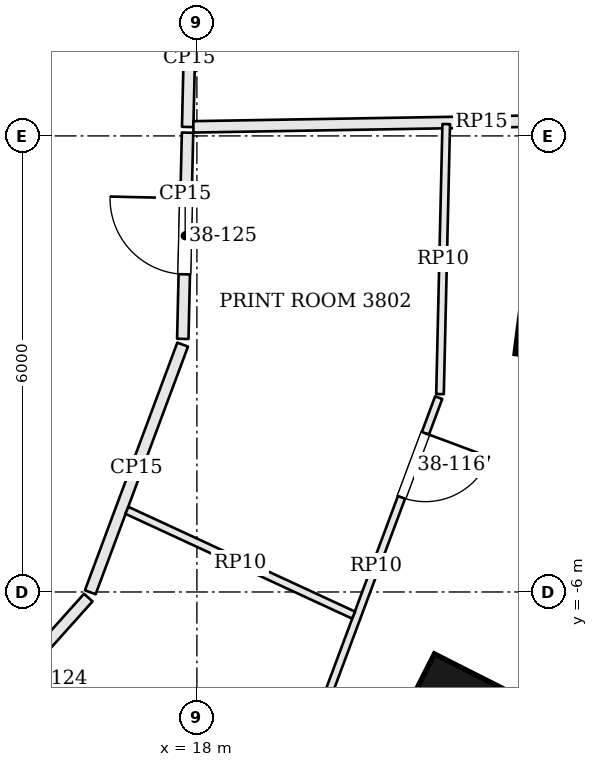
"""IFC4 building model, lengths in metres.
Left out: names, types, materials, properties, quantities, classifications, styles, units other than length and angle.
Written with IfcOpenShell. Run it as: python <this file> out.ifc"""

import sys

from ifc_helpers import new_model, si_unit, direction, frame, frame_2d, origin, origin_2d, place, context, subcontext, project, spatial, rectangle, extrude, element, fill, save


model = new_model("IFC4")
c1 = context("Model", 3, precision=1e-05, world=origin(), true_north=direction((0.0, 1.0)))
c2 = subcontext(c1, "Body", "Model", "MODEL_VIEW")
j1 = project(units=[si_unit("LENGTHUNIT", "METRE"), si_unit("PLANEANGLEUNIT", "RADIAN")], contexts=[c1])
p1 = place(None, origin())
s1 = spatial("IfcSite", under=j1, at=p1, CompositionType="ELEMENT")
p2 = place(p1, origin())
s2 = spatial("IfcBuilding", under=s1, at=p2, CompositionType="ELEMENT")
p3 = place(p2, frame((0.0, 0.0, 157.8)))
s3 = spatial("IfcBuildingStorey", under=s2, at=p3, CompositionType="ELEMENT", Elevation=157.8)
for number, where, z_axis, x_axis in (
    (1, (21.367, -7.554, 0.0), (0.0, 0.0, 1.0), (0.452, 0.892, 0.0)),
    (2, (22.802, -2.389, 0.0), (0.0, 0.0, 1.0), (0.129, 0.992, 0.0)),
):
    element("IfcColumn", number, at=place(p3, frame(where, z_axis=z_axis, x_axis=x_axis)), inside=s3, PredefinedType="COLUMN", context=c2, shape_type="SweptSolid", body=[
        extrude(rectangle(XDim=1.1, YDim=1.1, at=origin_2d()), origin(), (0.0, 0.0, 1.0), 3.9),
    ])
p4 = place(p3, frame((17.879, 0.118, 0.0), z_axis=(0.0, 0.0, 1.0), x_axis=(0.023064558848, 0.999733977679, 0.0)))
e3 = element("IfcWall", 3, at=p4, inside=s3, PredefinedType="PARTITIONING", context=c2, shape_type="SweptSolid", body=[
    extrude(rectangle(XDim=1.81, YDim=0.15, at=frame_2d((0.905, 0.0))), origin(), (0.0, 0.0, 1.0), 3.198),
])
p5 = place(p3, frame((25.538, 0.247, 0.0), z_axis=(0.0, 0.0, 1.0), x_axis=(-0.999857777193, -0.016864915832, 0.0)))
e4 = element("IfcWall", 4, at=p5, inside=s3, PredefinedType="PARTITIONING", context=c2, shape_type="SweptSolid", body=[
    extrude(rectangle(XDim=7.585, YDim=0.15, at=frame_2d((3.793, 0.0))), origin(), (0.0, 0.0, 1.0), 3.234),
])
p6 = place(p3, frame((14.709, -8.152, 0.0), z_axis=(0.0, 0.0, 1.0), x_axis=(0.667275630306, 0.744810870758, 0.0)))
e5 = element("IfcWall", 5, at=p6, inside=s3, PredefinedType="PARTITIONING", context=c2, shape_type="SweptSolid", body=[
    extrude(rectangle(XDim=2.79, YDim=0.15, at=frame_2d((1.395, 0.0))), origin(), (0.0, 0.0, 1.0), 3.198),
])
p7 = place(p6, frame((0.85, 0.0, 0.0)))
e6 = element("IfcOpeningElement", 6, at=p7, cuts=e5, PredefinedType="OPENING", context=c2, shape_type="SweptSolid", body=[
    extrude(rectangle(XDim=1.0, YDim=2.1, at=frame_2d((0.5, 1.05))), frame((0.0, 0.085, 0.0), z_axis=(0.0, -1.0, 0.0), x_axis=(1.0, 0.0, 0.0)), (0.0, 0.0, 1.0), 0.17),
])
p8 = place(p3, frame((16.597, -6.003, 0.0), z_axis=(0.0, 0.0, 1.0), x_axis=(0.349499455299, 0.936936567088, 0.0)))
e7 = element("IfcWall", 7, at=p8, inside=s3, PredefinedType="PARTITIONING", context=c2, shape_type="SweptSolid", body=[
    extrude(rectangle(XDim=3.477, YDim=0.15, at=frame_2d((1.739, 0.0))), origin(), (0.0, 0.0, 1.0), 3.198),
])
p9 = place(p3, frame((17.814, -2.67, 0.0), z_axis=(0.0, 0.0, 1.0), x_axis=(0.02302997412, 0.999734774974, 0.0)))
e8 = element("IfcWall", 8, at=p9, inside=s3, PredefinedType="PARTITIONING", context=c2, shape_type="SweptSolid", body=[
    extrude(rectangle(XDim=2.714, YDim=0.15, at=frame_2d((1.357, 0.0))), origin(), (0.0, 0.0, 1.0), 3.198),
])
p10 = place(p9, frame((0.85, 0.0, 0.0)))
e9 = element("IfcOpeningElement", 9, at=p10, cuts=e8, PredefinedType="OPENING", context=c2, shape_type="SweptSolid", body=[
    extrude(rectangle(XDim=1.0, YDim=2.1, at=frame_2d((0.5, 1.05))), frame((0.0, 0.085, 0.0), z_axis=(0.0, -1.0, 0.0), x_axis=(1.0, 0.0, 0.0)), (0.0, 0.0, 1.0), 0.17),
])
p11 = place(p3, frame((21.281, 0.155, 0.0), z_axis=(0.0, 0.0, 1.0), x_axis=(-0.02308980071, -0.999733395012, 0.0)))
e10 = element("IfcWall", 10, at=p11, inside=s3, PredefinedType="PARTITIONING", context=c2, shape_type="SweptSolid", body=[
    extrude(rectangle(XDim=3.553, YDim=0.1, at=frame_2d((1.776, 0.0))), origin(), (0.0, 0.0, 1.0), 3.184),
])
p12 = place(p3, frame((21.181, -3.443, 0.0), z_axis=(0.0, 0.0, 1.0), x_axis=(-0.349438657616, -0.936959243811, 0.0)))
e11 = element("IfcWall", 11, at=p12, inside=s3, PredefinedType="PARTITIONING", context=c2, shape_type="SweptSolid", body=[
    extrude(rectangle(XDim=4.718, YDim=0.1, at=frame_2d((2.359, 0.0))), origin(), (0.0, 0.0, 1.0), 3.184),
])
p13 = place(p12, frame((0.5, 0.0, 0.0)))
e12 = element("IfcOpeningElement", 12, at=p13, cuts=e11, PredefinedType="OPENING", context=c2, shape_type="SweptSolid", body=[
    extrude(rectangle(XDim=0.9, YDim=2.1, at=frame_2d((0.45, 1.05))), frame((0.0, 0.06, 0.0), z_axis=(0.0, -1.0, 0.0), x_axis=(1.0, 0.0, 0.0)), (0.0, 0.0, 1.0), 0.12),
])
p14 = place(p3, frame((17.079, -4.926, 0.0), z_axis=(0.0, 0.0, 1.0), x_axis=(0.90772648151, -0.4195624325, 0.0)))
e13 = element("IfcWall", 13, at=p14, inside=s3, PredefinedType="PARTITIONING", context=c2, shape_type="SweptSolid", body=[
    extrude(rectangle(XDim=3.285, YDim=0.1, at=frame_2d((1.642, 0.0))), origin(), (0.0, 0.0, 1.0), 3.184),
])
p15 = place(p13, origin())
e14 = element("IfcDoor", 14, at=p15, inside=s3, OperationType="SINGLE_SWING_LEFT", PredefinedType="DOOR", context=c2, shape_type="SweptSolid", body=[
    extrude(rectangle(XDim=0.9, YDim=2.1, at=frame_2d((0.45, 1.05))), frame((0.0, 0.025, 0.0), z_axis=(0.0, -1.0, 0.0), x_axis=(1.0, 0.0, 0.0)), (0.0, 0.0, 1.0), 0.05),
])
fill(e12, e14)
p16 = place(p10, origin())
e15 = element("IfcDoor", 15, at=p16, inside=s3, OperationType="SINGLE_SWING_RIGHT", PredefinedType="DOOR", context=c2, shape_type="SweptSolid", body=[
    extrude(rectangle(XDim=1.0, YDim=2.1, at=frame_2d((0.5, 1.05))), frame((0.0, 0.025, 0.0), z_axis=(0.0, -1.0, 0.0), x_axis=(1.0, 0.0, 0.0)), (0.0, 0.0, 1.0), 0.05),
])
fill(e9, e15)
save(model, sys.argv[1])
